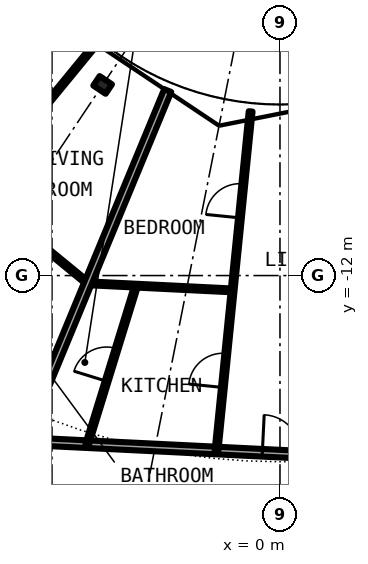
"""IFC4 building model, lengths in metres.
Left out: names, types, materials, properties, quantities, classifications, styles, units other than length and angle.
Written with IfcOpenShell. Run it as: python <this file> out.ifc"""

import sys

from ifc_helpers import new_model, si_unit, direction, frame, frame_2d, origin, origin_2d, place, context, subcontext, project, spatial, rectangle, i_section, extrude, element, fill, save


model = new_model("IFC4")
c1 = context("Model", 3, precision=1e-05, world=origin(), true_north=direction((0.0, 1.0)))
c2 = subcontext(c1, "Body", "Model", "MODEL_VIEW")
j1 = project(units=[si_unit("LENGTHUNIT", "METRE"), si_unit("PLANEANGLEUNIT", "RADIAN")], contexts=[c1])
p1 = place(None, origin())
s1 = spatial("IfcSite", under=j1, at=p1, CompositionType="ELEMENT")
p2 = place(p1, origin())
s2 = spatial("IfcBuilding", under=s1, at=p2, CompositionType="ELEMENT")
p3 = place(p2, frame((0.0, 0.0, 151.3)))
s3 = spatial("IfcBuildingStorey", under=s2, at=p3, CompositionType="ELEMENT", Elevation=151.3)
p4 = place(p3, frame((-4.667, -6.984, 0.0), z_axis=(0.0, 0.0, 1.0), x_axis=(-0.55557023302, -0.831469612303, 0.0)))
e1 = element("IfcColumn", 1, at=p4, inside=s3, PredefinedType="COLUMN", context=c2, shape_type="SweptSolid", body=[
    extrude(i_section(OverallWidth=0.3, OverallDepth=0.39, WebThickness=0.011, FlangeThickness=0.019, FilletRadius=0.027, at=origin_2d()), origin(), (0.0, 0.0, 1.0), 3.05),
])
p5 = place(p3, frame((-6.778, -16.353, 0.0), z_axis=(0.0, 0.0, 1.0), x_axis=(0.998797244, -0.049031269395, 0.0)))
e2 = element("IfcWall", 2, at=p5, inside=s3, PredefinedType="PARTITIONING", context=c2, shape_type="SweptSolid", body=[
    extrude(rectangle(XDim=11.93, YDim=0.2, at=frame_2d((5.965, 0.0))), origin(), (0.0, 0.0, 1.0), 2.7),
])
p6 = place(p5, frame((6.321, 0.0, 0.0)))
e3 = element("IfcOpeningElement", 3, at=p6, cuts=e2, PredefinedType="OPENING", context=c2, shape_type="SweptSolid", body=[
    extrude(rectangle(XDim=1.0, YDim=2.3, at=frame_2d((0.5, 1.15))), frame((0.0, 0.11, 0.0), z_axis=(0.0, -1.0, 0.0), x_axis=(1.0, 0.0, 0.0)), (0.0, 0.0, 1.0), 0.22),
])
p7 = place(p3, frame((-7.031, -10.582, 0.0), z_axis=(0.0, 0.0, 1.0), x_axis=(0.772943675046, -0.634474645046, 0.0)))
e4 = element("IfcWall", 4, at=p7, inside=s3, PredefinedType="PARTITIONING", context=c2, shape_type="SweptSolid", body=[
    extrude(rectangle(XDim=2.557, YDim=0.1, at=frame_2d((1.278, 0.0))), origin(), (0.0, 0.0, 1.0), 2.7),
])
p8 = place(p3, frame((-5.06, -12.203, 0.0), z_axis=(0.0, 0.0, 1.0), x_axis=(0.998784958727, -0.049280891026, 0.0)))
e5 = element("IfcWall", 5, at=p8, inside=s3, PredefinedType="PARTITIONING", context=c2, shape_type="SweptSolid", body=[
    extrude(rectangle(XDim=3.82, YDim=0.1, at=frame_2d((1.91, 0.0))), origin(), (0.0, 0.0, 1.0), 2.7),
])
p9 = place(p3, frame((-8.019, -9.771, 0.0), z_axis=(0.0, 0.0, 1.0), x_axis=(0.634401778971, 0.773003481776, 0.0)))
e6 = element("IfcWall", 6, at=p9, inside=s3, PredefinedType="PARTITIONING", context=c2, shape_type="SweptSolid", body=[
    extrude(rectangle(XDim=4.92, YDim=0.1, at=frame_2d((2.46, 0.0))), origin(), (0.0, 0.0, 1.0), 2.7),
])
p10 = place(p9, frame((2.01, 0.0, 0.0)))
e7 = element("IfcOpeningElement", 7, at=p10, cuts=e6, PredefinedType="OPENING", context=c2, shape_type="SweptSolid", body=[
    extrude(rectangle(XDim=0.9, YDim=2.3, at=frame_2d((0.45, 1.15))), frame((0.0, 0.06, 0.0), z_axis=(0.0, -1.0, 0.0), x_axis=(1.0, 0.0, 0.0)), (0.0, 0.0, 1.0), 0.12),
])
p11 = place(p3, frame((-6.774, -16.353, 0.0), z_axis=(0.0, 0.0, 1.0), x_axis=(0.382716169203, 0.92386597179, 0.0)))
e8 = element("IfcWall", 8, at=p11, inside=s3, PredefinedType="PARTITIONING", context=c2, shape_type="SweptSolid", body=[
    extrude(rectangle(XDim=9.981, YDim=0.2, at=frame_2d((4.99, 0.0))), origin(), (0.0, 0.0, 1.0), 2.7),
])
p12 = place(p3, frame((-5.072, -16.436, 0.0), z_axis=(0.0, 0.0, 1.0), x_axis=(0.294934866503, 0.955517359612, 0.0)))
e9 = element("IfcWall", 9, at=p12, inside=s3, PredefinedType="PARTITIONING", context=c2, shape_type="SweptSolid", body=[
    extrude(rectangle(XDim=4.364, YDim=0.1, at=frame_2d((2.182, 0.0))), origin(), (0.0, 0.0, 1.0), 2.7),
])
p13 = place(p12, frame((1.732, 0.0, 0.0)))
e10 = element("IfcOpeningElement", 10, at=p13, cuts=e9, PredefinedType="OPENING", context=c2, shape_type="SweptSolid", body=[
    extrude(rectangle(XDim=0.9, YDim=2.3, at=frame_2d((0.45, 1.15))), frame((0.0, 0.06, 0.0), z_axis=(0.0, -1.0, 0.0), x_axis=(1.0, 0.0, 0.0)), (0.0, 0.0, 1.0), 0.12),
])
p14 = place(p3, frame((-1.669, -16.603, 0.0), z_axis=(0.0, 0.0, 1.0), x_axis=(0.100029361081, 0.994984485769, 0.0)))
e11 = element("IfcWall", 11, at=p14, inside=s3, PredefinedType="PARTITIONING", context=c2, shape_type="SweptSolid", body=[
    extrude(rectangle(XDim=8.967, YDim=0.1, at=frame_2d((4.483, 0.0))), origin(), (0.0, 0.0, 1.0), 2.7),
])
p15 = place(p14, frame((1.667, 0.0, 0.0)))
e12 = element("IfcOpeningElement", 12, at=p15, cuts=e11, PredefinedType="OPENING", context=c2, shape_type="SweptSolid", body=[
    extrude(rectangle(XDim=0.9, YDim=2.3, at=frame_2d((0.45, 1.15))), frame((0.0, 0.06, 0.0), z_axis=(0.0, -1.0, 0.0), x_axis=(1.0, 0.0, 0.0)), (0.0, 0.0, 1.0), 0.12),
])
p16 = place(p14, frame((6.152, 0.0, 0.0)))
e13 = element("IfcOpeningElement", 13, at=p16, cuts=e11, PredefinedType="OPENING", context=c2, shape_type="SweptSolid", body=[
    extrude(rectangle(XDim=0.9, YDim=2.3, at=frame_2d((0.45, 1.15))), frame((0.0, 0.06, 0.0), z_axis=(0.0, -1.0, 0.0), x_axis=(1.0, 0.0, 0.0)), (0.0, 0.0, 1.0), 0.12),
])
p17 = place(p6, origin())
e14 = element("IfcDoor", 14, at=p17, inside=s3, OperationType="SINGLE_SWING_RIGHT", PredefinedType="DOOR", context=c2, shape_type="SweptSolid", body=[
    extrude(rectangle(XDim=1.0, YDim=2.3, at=frame_2d((0.5, 1.15))), frame((0.0, 0.025, 0.0), z_axis=(0.0, -1.0, 0.0), x_axis=(1.0, 0.0, 0.0)), (0.0, 0.0, 1.0), 0.05),
])
fill(e3, e14)
p18 = place(p15, origin())
e15 = element("IfcDoor", 15, at=p18, inside=s3, OperationType="SINGLE_SWING_LEFT", PredefinedType="DOOR", context=c2, shape_type="SweptSolid", body=[
    extrude(rectangle(XDim=0.9, YDim=2.3, at=frame_2d((0.45, 1.15))), frame((0.0, 0.025, 0.0), z_axis=(0.0, -1.0, 0.0), x_axis=(1.0, 0.0, 0.0)), (0.0, 0.0, 1.0), 0.05),
])
fill(e12, e15)
p19 = place(p13, origin())
e16 = element("IfcDoor", 16, at=p19, inside=s3, OperationType="SINGLE_SWING_RIGHT", PredefinedType="DOOR", context=c2, shape_type="SweptSolid", body=[
    extrude(rectangle(XDim=0.9, YDim=2.3, at=frame_2d((0.45, 1.15))), frame((0.0, 0.025, 0.0), z_axis=(0.0, -1.0, 0.0), x_axis=(1.0, 0.0, 0.0)), (0.0, 0.0, 1.0), 0.05),
])
fill(e10, e16)
p20 = place(p16, origin())
e17 = element("IfcDoor", 17, at=p20, inside=s3, OperationType="SINGLE_SWING_RIGHT", PredefinedType="DOOR", context=c2, shape_type="SweptSolid", body=[
    extrude(rectangle(XDim=0.9, YDim=2.3, at=frame_2d((0.45, 1.15))), frame((0.0, 0.025, 0.0), z_axis=(0.0, -1.0, 0.0), x_axis=(1.0, 0.0, 0.0)), (0.0, 0.0, 1.0), 0.05),
])
fill(e13, e17)
save(model, sys.argv[1])
